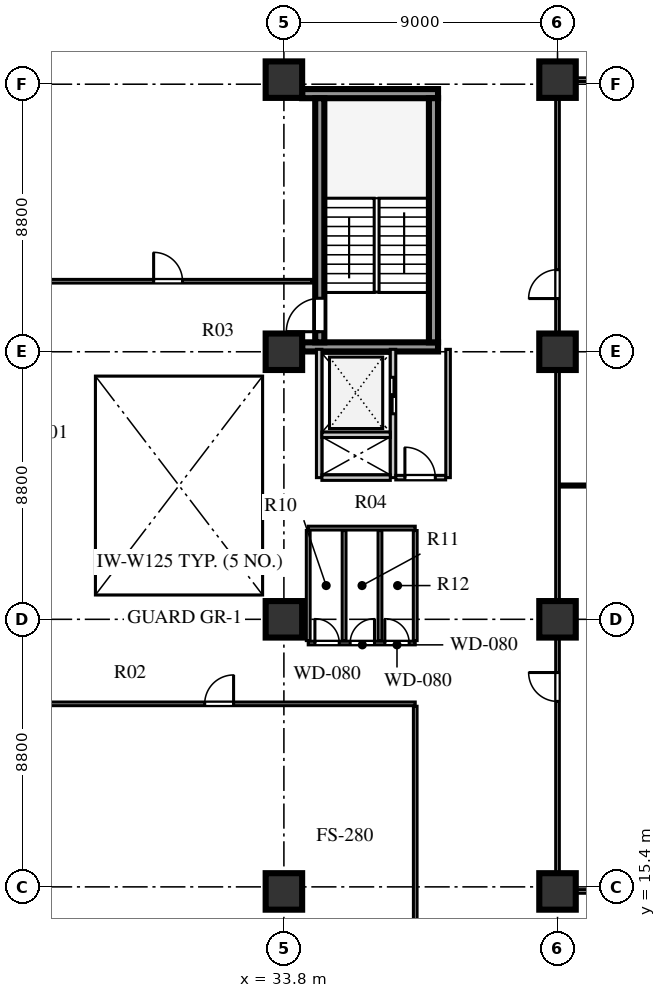
"""IFC4 building model, lengths in metres.
Left out: names, types, materials, properties, quantities, classifications, styles, units other than length and angle.
Written with IfcOpenShell. Run it as: python <this file> out.ifc"""

import sys

from ifc_helpers import new_model, si_unit, direction, frame, frame_2d, origin, origin_2d, place, context, subcontext, project, spatial, rectangle, extrude, element, fill, save


model = new_model("IFC4")
c1 = context("Model", 3, precision=1e-05, world=origin(), true_north=direction((0.0, 1.0)))
c2 = subcontext(c1, "Body", "Model", "MODEL_VIEW")
j1 = project(units=[si_unit("LENGTHUNIT", "METRE"), si_unit("PLANEANGLEUNIT", "RADIAN")], contexts=[c1])
p1 = place(None, origin())
s1 = spatial("IfcSite", under=j1, at=p1, CompositionType="ELEMENT")
p2 = place(p1, origin())
s2 = spatial("IfcBuilding", under=s1, at=p2, CompositionType="ELEMENT")
p3 = place(p2, frame((0.0, 0.0, 34.0)))
s3 = spatial("IfcBuildingStorey", under=s2, at=p3, CompositionType="ELEMENT", Elevation=34.0)
for number, where, z_axis, x_axis in (
    (1, (34.4, 33.16, 0.0), (0.0, 0.0, 1.0), (1.0, 0.0, 0.0)),
    (2, (34.4, 41.49, 0.0), (0.0, 0.0, 1.0), (1.0, 0.0, 0.0)),
):
    element("IfcWall", number, at=place(p3, frame(where, z_axis=z_axis, x_axis=x_axis)), inside=s3, PredefinedType="SHEAR", context=c2, shape_type="SweptSolid", body=[
        extrude(rectangle(XDim=4.47, YDim=0.3, at=frame_2d((2.235, 0.0))), origin(), (0.0, 0.0, 1.0), 3.72),
    ])
p4 = place(p3, frame((34.98, 33.31, 0.0), z_axis=(0.0, 0.0, 1.0), x_axis=(0.0, 1.0, 0.0)))
e3 = element("IfcWall", 3, at=p4, inside=s3, PredefinedType="SHEAR", context=c2, shape_type="SweptSolid", body=[
    extrude(rectangle(XDim=8.03, YDim=0.3, at=frame_2d((4.015, 0.0))), origin(), (0.0, 0.0, 1.0), 3.72),
])
p5 = place(p4, frame((0.35, 0.0, 0.0)))
e4 = element("IfcOpeningElement", 4, at=p5, cuts=e3, PredefinedType="OPENING", context=c2, shape_type="SweptSolid", body=[
    extrude(rectangle(XDim=1.1, YDim=2.1, at=frame_2d((0.55, 1.05))), frame((0.0, 0.16, 0.0), z_axis=(0.0, -1.0, 0.0), x_axis=(1.0, 0.0, 0.0)), (0.0, 0.0, 1.0), 0.32),
])
p6 = place(p3, frame((38.72, 33.31, 0.0), z_axis=(0.0, 0.0, 1.0), x_axis=(0.0, 1.0, 0.0)))
e5 = element("IfcWall", 5, at=p6, inside=s3, PredefinedType="SHEAR", context=c2, shape_type="SweptSolid", body=[
    extrude(rectangle(XDim=8.03, YDim=0.3, at=frame_2d((4.015, 0.0))), origin(), (0.0, 0.0, 1.0), 3.72),
])
for number, where, z_axis, x_axis in (
    (6, (33.8, 15.25, 0.0), (0.0, 0.0, 1.0), (1.0, 0.0, 0.0)),
    (7, (33.8, 24.2, 0.0), (0.0, 0.0, 1.0), (1.0, 0.0, 0.0)),
    (8, (33.8, 33.0, 0.0), (0.0, 0.0, 1.0), (1.0, 0.0, 0.0)),
    (9, (33.8, 41.95, 0.0), (0.0, 0.0, 1.0), (1.0, 0.0, 0.0)),
    (10, (42.8, 15.25, 0.0), (0.0, 0.0, 1.0), (1.0, 0.0, 0.0)),
    (11, (42.8, 24.2, 0.0), (0.0, 0.0, 1.0), (1.0, 0.0, 0.0)),
    (12, (42.8, 33.0, 0.0), (0.0, 0.0, 1.0), (1.0, 0.0, 0.0)),
    (13, (42.8, 41.95, 0.0), (0.0, 0.0, 1.0), (1.0, 0.0, 0.0)),
):
    element("IfcColumn", number, at=place(p3, frame(where, z_axis=z_axis, x_axis=x_axis)), inside=s3, PredefinedType="COLUMN", context=c2, shape_type="SweptSolid", body=[
        extrude(rectangle(XDim=1.2, YDim=1.2, at=origin_2d()), origin(), (0.0, 0.0, 1.0), 3.72),
    ])
p7 = place(p3, frame((34.96, 28.86, 0.0), z_axis=(0.0, 0.0, 1.0), x_axis=(0.0, 1.0, 0.0)))
e14 = element("IfcWall", 14, at=p7, inside=s3, PredefinedType="SOLIDWALL", context=c2, shape_type="SweptSolid", body=[
    extrude(rectangle(XDim=4.22, YDim=0.18, at=frame_2d((2.11, 0.0))), origin(), (0.0, 0.0, 1.0), 3.72),
])
p8 = place(p3, frame((37.39, 28.86, 0.0), z_axis=(0.0, 0.0, 1.0), x_axis=(0.0, 1.0, 0.0)))
e15 = element("IfcWall", 15, at=p8, inside=s3, PredefinedType="SOLIDWALL", context=c2, shape_type="SweptSolid", body=[
    extrude(rectangle(XDim=4.22, YDim=0.18, at=frame_2d((2.11, 0.0))), origin(), (0.0, 0.0, 1.0), 3.72),
])
p9 = place(p8, frame((2.1, 0.0, 0.0)))
e16 = element("IfcOpeningElement", 16, at=p9, cuts=e15, PredefinedType="OPENING", context=c2, shape_type="SweptSolid", body=[
    extrude(rectangle(XDim=1.2, YDim=2.12, at=frame_2d((0.6, 1.06))), frame((0.0, 0.1, 0.0), z_axis=(0.0, -1.0, 0.0), x_axis=(1.0, 0.0, 0.0)), (0.0, 0.0, 1.0), 0.2),
])
for number, where, z_axis, x_axis in (
    (17, (35.05, 28.86, 0.0), (0.0, 0.0, 1.0), (1.0, 0.0, 0.0)),
    (18, (35.05, 30.27, 0.0), (0.0, 0.0, 1.0), (1.0, 0.0, 0.0)),
):
    element("IfcWall", number, at=place(p3, frame(where, z_axis=z_axis, x_axis=x_axis)), inside=s3, PredefinedType="SOLIDWALL", context=c2, shape_type="SweptSolid", body=[
        extrude(rectangle(XDim=2.25, YDim=0.18, at=frame_2d((1.125, 0.0))), origin(), (0.0, 0.0, 1.0), 3.72),
    ])
p10 = place(p3, frame((39.2, 28.86, 0.0), z_axis=(0.0, 0.0, 1.0), x_axis=(0.0, 1.0, 0.0)))
e19 = element("IfcWall", 19, at=p10, inside=s3, PredefinedType="PARTITIONING", context=c2, shape_type="SweptSolid", body=[
    extrude(rectangle(XDim=4.22, YDim=0.15, at=frame_2d((2.11, 0.0))), origin(), (0.0, 0.0, 1.0), 3.72),
])
p11 = place(p3, frame((37.48, 28.86, 0.0), z_axis=(0.0, 0.0, 1.0), x_axis=(1.0, 0.0, 0.0)))
e20 = element("IfcWall", 20, at=p11, inside=s3, PredefinedType="PARTITIONING", context=c2, shape_type="SweptSolid", body=[
    extrude(rectangle(XDim=1.64, YDim=0.15, at=frame_2d((0.82, 0.0))), origin(), (0.0, 0.0, 1.0), 3.72),
])
p12 = place(p11, frame((0.3, 0.0, 0.0)))
e21 = element("IfcOpeningElement", 21, at=p12, cuts=e20, PredefinedType="OPENING", context=c2, shape_type="SweptSolid", body=[
    extrude(rectangle(XDim=1.0, YDim=2.1, at=frame_2d((0.5, 1.05))), frame((0.0, 0.085, 0.0), z_axis=(0.0, -1.0, 0.0), x_axis=(1.0, 0.0, 0.0)), (0.0, 0.0, 1.0), 0.17),
])
p13 = place(p3, frame((25.25, 21.42, 0.0), z_axis=(0.0, 0.0, 1.0), x_axis=(1.0, 0.0, 0.0)))
e22 = element("IfcWall", 22, at=p13, inside=s3, PredefinedType="PARTITIONING", context=c2, shape_type="SweptSolid", body=[
    extrude(rectangle(XDim=12.87, YDim=0.12, at=frame_2d((6.435, 0.0))), origin(), (0.0, 0.0, 1.0), 3.32),
])
p14 = place(p13, frame((5.945, 0.0, 0.0)))
e23 = element("IfcOpeningElement", 23, at=p14, cuts=e22, PredefinedType="OPENING", context=c2, shape_type="SweptSolid", body=[
    extrude(rectangle(XDim=0.95, YDim=2.08, at=frame_2d((0.475, 1.04))), frame((0.0, 0.07, 0.0), z_axis=(0.0, -1.0, 0.0), x_axis=(1.0, 0.0, 0.0)), (0.0, 0.0, 1.0), 0.14),
])
p15 = place(p3, frame((38.12, 6.88, 0.0), z_axis=(0.0, 0.0, 1.0), x_axis=(0.0, 1.0, 0.0)))
e24 = element("IfcWall", 24, at=p15, inside=s3, PredefinedType="PARTITIONING", context=c2, shape_type="SweptSolid", body=[
    extrude(rectangle(XDim=14.46, YDim=0.12, at=frame_2d((7.23, 0.0))), origin(), (0.0, 0.0, 1.0), 3.72),
])
p16 = place(p3, frame((34.6, 23.42, 0.0), z_axis=(0.0, 0.0, 1.0), x_axis=(1.0, 0.0, 0.0)))
e25 = element("IfcWall", 25, at=p16, inside=s3, PredefinedType="PARTITIONING", context=c2, shape_type="SweptSolid", body=[
    extrude(rectangle(XDim=3.52, YDim=0.12, at=frame_2d((1.76, 0.0))), origin(), (0.0, 0.0, 1.0), 3.72),
])
p17 = place(p16, frame((0.22, 0.0, 0.0)))
e26 = element("IfcOpeningElement", 26, at=p17, cuts=e25, PredefinedType="OPENING", context=c2, shape_type="SweptSolid", body=[
    extrude(rectangle(XDim=0.8, YDim=2.05, at=frame_2d((0.4, 1.025))), frame((0.0, 0.07, 0.0), z_axis=(0.0, -1.0, 0.0), x_axis=(1.0, 0.0, 0.0)), (0.0, 0.0, 1.0), 0.14),
])
p18 = place(p16, frame((1.38, 0.0, 0.0)))
e27 = element("IfcOpeningElement", 27, at=p18, cuts=e25, PredefinedType="OPENING", context=c2, shape_type="SweptSolid", body=[
    extrude(rectangle(XDim=0.8, YDim=2.05, at=frame_2d((0.4, 1.025))), frame((0.0, 0.07, 0.0), z_axis=(0.0, -1.0, 0.0), x_axis=(1.0, 0.0, 0.0)), (0.0, 0.0, 1.0), 0.14),
])
p19 = place(p16, frame((2.52, 0.0, 0.0)))
e28 = element("IfcOpeningElement", 28, at=p19, cuts=e25, PredefinedType="OPENING", context=c2, shape_type="SweptSolid", body=[
    extrude(rectangle(XDim=0.8, YDim=2.05, at=frame_2d((0.4, 1.025))), frame((0.0, 0.07, 0.0), z_axis=(0.0, -1.0, 0.0), x_axis=(1.0, 0.0, 0.0)), (0.0, 0.0, 1.0), 0.14),
])
p20 = place(p3, frame((25.25, 35.32, 0.0), z_axis=(0.0, 0.0, 1.0), x_axis=(1.0, 0.0, 0.0)))
e29 = element("IfcWall", 29, at=p20, inside=s3, PredefinedType="PARTITIONING", context=c2, shape_type="SweptSolid", body=[
    extrude(rectangle(XDim=9.47, YDim=0.12, at=frame_2d((4.735, 0.0))), origin(), (0.0, 0.0, 1.0), 3.72),
])
p21 = place(p20, frame((4.265, 0.0, 0.0)))
e30 = element("IfcOpeningElement", 30, at=p21, cuts=e29, PredefinedType="OPENING", context=c2, shape_type="SweptSolid", body=[
    extrude(rectangle(XDim=0.95, YDim=2.08, at=frame_2d((0.475, 1.04))), frame((0.0, 0.07, 0.0), z_axis=(0.0, -1.0, 0.0), x_axis=(1.0, 0.0, 0.0)), (0.0, 0.0, 1.0), 0.14),
])
p22 = place(p3, frame((42.8, 15.25, 0.0), z_axis=(0.0, 0.0, 1.0), x_axis=(0.0, 1.0, 0.0)))
e31 = element("IfcWall", 31, at=p22, inside=s3, PredefinedType="PARTITIONING", context=c2, shape_type="SweptSolid", body=[
    extrude(rectangle(XDim=26.7, YDim=0.12, at=frame_2d((13.35, 0.0))), origin(), (0.0, 0.0, 1.0), 3.02),
])
p23 = place(p22, frame((6.25, 0.0, 0.0)))
e32 = element("IfcOpeningElement", 32, at=p23, cuts=e31, PredefinedType="OPENING", context=c2, shape_type="SweptSolid", body=[
    extrude(rectangle(XDim=0.95, YDim=2.08, at=frame_2d((0.475, 1.04))), frame((0.0, 0.07, 0.0), z_axis=(0.0, -1.0, 0.0), x_axis=(1.0, 0.0, 0.0)), (0.0, 0.0, 1.0), 0.14),
])
p24 = place(p22, frame((19.5, 0.0, 0.0)))
e33 = element("IfcOpeningElement", 33, at=p24, cuts=e31, PredefinedType="OPENING", context=c2, shape_type="SweptSolid", body=[
    extrude(rectangle(XDim=0.95, YDim=2.08, at=frame_2d((0.475, 1.04))), frame((0.0, 0.07, 0.0), z_axis=(0.0, -1.0, 0.0), x_axis=(1.0, 0.0, 0.0)), (0.0, 0.0, 1.0), 0.14),
])
for number, where, z_axis, x_axis in (
    (34, (42.88, 15.25, 0.0), (0.0, 0.0, 1.0), (1.0, 0.0, 0.0)),
    (35, (42.88, 41.95, 0.0), (0.0, 0.0, 1.0), (1.0, 0.0, 0.0)),
):
    element("IfcWall", number, at=place(p3, frame(where, z_axis=z_axis, x_axis=x_axis)), inside=s3, PredefinedType="PARTITIONING", context=c2, shape_type="SweptSolid", body=[
        extrude(rectangle(XDim=8.64, YDim=0.12, at=frame_2d((4.32, 0.0))), origin(), (0.0, 0.0, 1.0), 3.22),
    ])
p25 = place(p3, frame((34.6, 27.2, 0.0), z_axis=(0.0, 0.0, 1.0), x_axis=(1.0, 0.0, 0.0)))
e36 = element("IfcWall", 36, at=p25, inside=s3, PredefinedType="PLUMBINGWALL", context=c2, shape_type="SweptSolid", body=[
    extrude(rectangle(XDim=3.52, YDim=0.125, at=frame_2d((1.76, 0.0))), origin(), (0.0, 0.0, 1.0), 3.32),
])
for number, where, z_axis, x_axis in (
    (37, (34.6, 23.5, 0.0), (0.0, 0.0, 1.0), (0.0, 1.0, 0.0)),
    (38, (38.12, 23.5, 0.0), (0.0, 0.0, 1.0), (0.0, 1.0, 0.0)),
    (39, (35.78, 23.5, 0.0), (0.0, 0.0, 1.0), (0.0, 1.0, 0.0)),
    (40, (36.96, 23.5, 0.0), (0.0, 0.0, 1.0), (0.0, 1.0, 0.0)),
):
    element("IfcWall", number, at=place(p3, frame(where, z_axis=z_axis, x_axis=x_axis)), inside=s3, PredefinedType="PLUMBINGWALL", context=c2, shape_type="SweptSolid", body=[
        extrude(rectangle(XDim=3.62, YDim=0.125, at=frame_2d((1.81, 0.0))), origin(), (0.0, 0.0, 1.0), 3.72),
    ])
p26 = place(p3, frame((42.88, 28.6, 0.0), z_axis=(0.0, 0.0, 1.0), x_axis=(1.0, 0.0, 0.0)))
e41 = element("IfcWall", 41, at=p26, inside=s3, PredefinedType="MOVABLE", context=c2, shape_type="SweptSolid", body=[
    extrude(rectangle(XDim=8.64, YDim=0.1, at=frame_2d((4.32, 0.0))), origin(), (0.0, 0.0, 1.0), 3.72),
])
p27 = place(p5, origin())
e42 = element("IfcDoor", 42, at=p27, inside=s3, OperationType="SINGLE_SWING_LEFT", PredefinedType="DOOR", context=c2, shape_type="SweptSolid", body=[
    extrude(rectangle(XDim=1.1, YDim=2.1, at=frame_2d((0.55, 1.05))), frame((0.0, 0.025, 0.0), z_axis=(0.0, -1.0, 0.0), x_axis=(1.0, 0.0, 0.0)), (0.0, 0.0, 1.0), 0.05),
])
fill(e4, e42)
p28 = place(p9, frame((1.2, 0.0, 0.0), z_axis=(0.0, 0.0, 1.0), x_axis=(-1.0, 0.0, 0.0)))
e43 = element("IfcDoor", 43, at=p28, inside=s3, OperationType="DOUBLE_DOOR_SLIDING", PredefinedType="DOOR", context=c2, shape_type="SweptSolid", body=[
    extrude(rectangle(XDim=1.2, YDim=2.12, at=frame_2d((0.6, 1.06))), frame((0.0, 0.025, 0.0), z_axis=(0.0, -1.0, 0.0), x_axis=(1.0, 0.0, 0.0)), (0.0, 0.0, 1.0), 0.05),
])
fill(e16, e43)
p29 = place(p12, origin())
e44 = element("IfcDoor", 44, at=p29, inside=s3, OperationType="SINGLE_SWING_LEFT", PredefinedType="DOOR", context=c2, shape_type="SweptSolid", body=[
    extrude(rectangle(XDim=1.0, YDim=2.1, at=frame_2d((0.5, 1.05))), frame((0.0, 0.025, 0.0), z_axis=(0.0, -1.0, 0.0), x_axis=(1.0, 0.0, 0.0)), (0.0, 0.0, 1.0), 0.05),
])
fill(e21, e44)
p30 = place(p17, origin())
e45 = element("IfcDoor", 45, at=p30, inside=s3, OperationType="SINGLE_SWING_LEFT", PredefinedType="DOOR", context=c2, shape_type="SweptSolid", body=[
    extrude(rectangle(XDim=0.8, YDim=2.05, at=frame_2d((0.4, 1.025))), frame((0.0, 0.025, 0.0), z_axis=(0.0, -1.0, 0.0), x_axis=(1.0, 0.0, 0.0)), (0.0, 0.0, 1.0), 0.05),
])
fill(e26, e45)
p31 = place(p18, origin())
e46 = element("IfcDoor", 46, at=p31, inside=s3, OperationType="SINGLE_SWING_RIGHT", PredefinedType="DOOR", context=c2, shape_type="SweptSolid", body=[
    extrude(rectangle(XDim=0.8, YDim=2.05, at=frame_2d((0.4, 1.025))), frame((0.0, 0.025, 0.0), z_axis=(0.0, -1.0, 0.0), x_axis=(1.0, 0.0, 0.0)), (0.0, 0.0, 1.0), 0.05),
])
fill(e27, e46)
p32 = place(p19, origin())
e47 = element("IfcDoor", 47, at=p32, inside=s3, OperationType="SINGLE_SWING_LEFT", PredefinedType="DOOR", context=c2, shape_type="SweptSolid", body=[
    extrude(rectangle(XDim=0.8, YDim=2.05, at=frame_2d((0.4, 1.025))), frame((0.0, 0.025, 0.0), z_axis=(0.0, -1.0, 0.0), x_axis=(1.0, 0.0, 0.0)), (0.0, 0.0, 1.0), 0.05),
])
fill(e28, e47)
p33 = place(p14, frame((0.95, 0.0, 0.0), z_axis=(0.0, 0.0, 1.0), x_axis=(-1.0, 0.0, 0.0)))
e48 = element("IfcDoor", 48, at=p33, inside=s3, OperationType="SINGLE_SWING_LEFT", PredefinedType="DOOR", context=c2, shape_type="SweptSolid", body=[
    extrude(rectangle(XDim=0.95, YDim=2.08, at=frame_2d((0.475, 1.04))), frame((0.0, 0.025, 0.0), z_axis=(0.0, -1.0, 0.0), x_axis=(1.0, 0.0, 0.0)), (0.0, 0.0, 1.0), 0.05),
])
fill(e23, e48)
p34 = place(p23, origin())
e49 = element("IfcDoor", 49, at=p34, inside=s3, OperationType="SINGLE_SWING_RIGHT", PredefinedType="DOOR", context=c2, shape_type="SweptSolid", body=[
    extrude(rectangle(XDim=0.95, YDim=2.08, at=frame_2d((0.475, 1.04))), frame((0.0, 0.025, 0.0), z_axis=(0.0, -1.0, 0.0), x_axis=(1.0, 0.0, 0.0)), (0.0, 0.0, 1.0), 0.05),
])
fill(e32, e49)
p35 = place(p24, origin())
e50 = element("IfcDoor", 50, at=p35, inside=s3, OperationType="SINGLE_SWING_LEFT", PredefinedType="DOOR", context=c2, shape_type="SweptSolid", body=[
    extrude(rectangle(XDim=0.95, YDim=2.08, at=frame_2d((0.475, 1.04))), frame((0.0, 0.025, 0.0), z_axis=(0.0, -1.0, 0.0), x_axis=(1.0, 0.0, 0.0)), (0.0, 0.0, 1.0), 0.05),
])
fill(e33, e50)
p36 = place(p21, origin())
e51 = element("IfcDoor", 51, at=p36, inside=s3, OperationType="SINGLE_SWING_LEFT", PredefinedType="DOOR", context=c2, shape_type="SweptSolid", body=[
    extrude(rectangle(XDim=0.95, YDim=2.08, at=frame_2d((0.475, 1.04))), frame((0.0, 0.025, 0.0), z_axis=(0.0, -1.0, 0.0), x_axis=(1.0, 0.0, 0.0)), (0.0, 0.0, 1.0), 0.05),
])
fill(e30, e51)
save(model, sys.argv[1])
